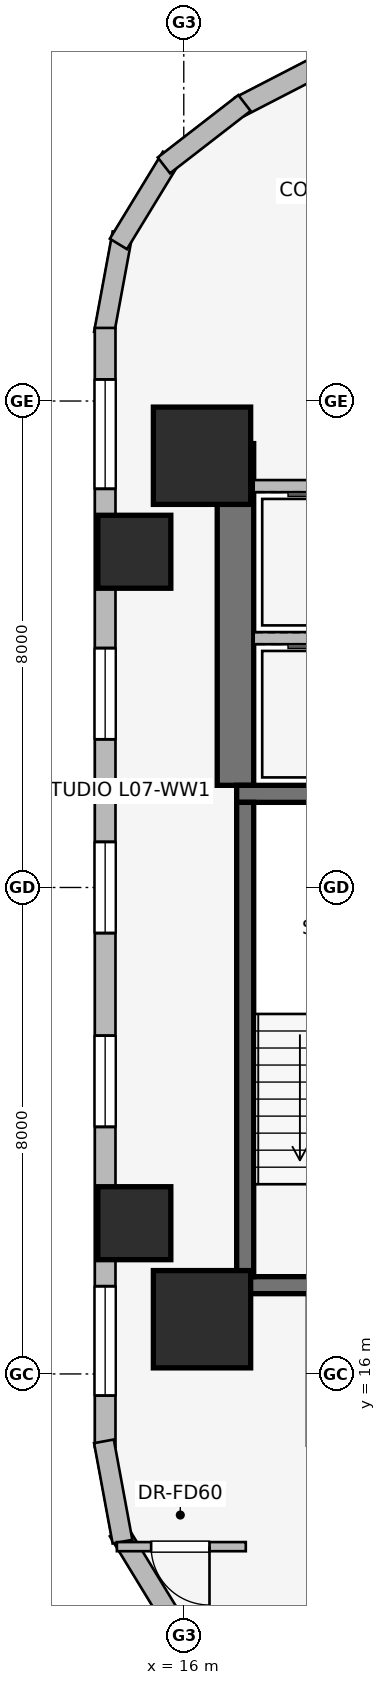
"""IFC4 building model, lengths in metres.
Left out: names, types, materials, properties, quantities, classifications, styles, units other than length and angle.
Written with IfcOpenShell. Run it as: python <this file> out.ifc"""

import sys

from ifc_helpers import new_model, si_unit, direction, frame, frame_2d, origin, origin_2d, place, context, subcontext, project, spatial, rectangle, extrude, element, fill, save


model = new_model("IFC4")
c1 = context("Model", 3, precision=1e-05, world=origin(), true_north=direction((0.0, 1.0)))
c2 = subcontext(c1, "Body", "Model", "MODEL_VIEW")
j1 = project(units=[si_unit("LENGTHUNIT", "METRE"), si_unit("PLANEANGLEUNIT", "RADIAN")], contexts=[c1])
p1 = place(None, origin())
s1 = spatial("IfcSite", under=j1, at=p1, CompositionType="ELEMENT")
p2 = place(p1, origin())
s2 = spatial("IfcBuilding", under=s1, at=p2, CompositionType="ELEMENT")
p3 = place(p2, frame((0.0, 0.0, 30.65)))
s3 = spatial("IfcBuildingStorey", under=s2, at=p3, CompositionType="ELEMENT", Elevation=30.65)
p4 = place(p3, frame((16.85, 25.68, 0.0), z_axis=(0.0, 0.0, 1.0), x_axis=(0.0, 1.0, 0.0)))
e1 = element("IfcWall", 1, at=p4, inside=s3, PredefinedType="SHEAR", context=c2, shape_type="SweptSolid", body=[
    extrude(rectangle(XDim=5.62, YDim=0.6, at=frame_2d((2.81, 0.0))), origin(), (0.0, 0.0, 1.0), 3.65),
])
for number, where, z_axis, x_axis in (
    (2, (16.87, 17.46, 0.0), (0.0, 0.0, 1.0), (1.0, 0.0, 0.0)),
    (3, (20.63, 25.54, 0.0), (0.0, 0.0, 1.0), (-1.0, 0.0, 0.0)),
):
    element("IfcWall", number, at=place(p3, frame(where, z_axis=z_axis, x_axis=x_axis)), inside=s3, PredefinedType="SHEAR", context=c2, shape_type="SweptSolid", body=[
        extrude(rectangle(XDim=3.76, YDim=0.28, at=frame_2d((1.88, 0.0))), origin(), (0.0, 0.0, 1.0), 3.65),
    ])
p5 = place(p3, frame((17.01, 25.4, 0.0), z_axis=(0.0, 0.0, 1.0), x_axis=(0.0, -1.0, 0.0)))
e4 = element("IfcWall", 4, at=p5, inside=s3, PredefinedType="SHEAR", context=c2, shape_type="SweptSolid", body=[
    extrude(rectangle(XDim=7.8, YDim=0.28, at=frame_2d((3.9, 0.0))), origin(), (0.0, 0.0, 1.0), 3.65),
])
for number, where, z_axis, x_axis in (
    (5, (16.3, 16.9, 0.0), (0.0, 0.0, 1.0), (1.0, 0.0, 0.0)),
    (6, (16.3, 31.1, 0.0), (0.0, 0.0, 1.0), (1.0, 0.0, 0.0)),
):
    element("IfcColumn", number, at=place(p3, frame(where, z_axis=z_axis, x_axis=x_axis)), inside=s3, PredefinedType="COLUMN", context=c2, shape_type="SweptSolid", body=[
        extrude(rectangle(XDim=1.6, YDim=1.6, at=origin_2d()), origin(), (0.0, 0.0, 1.0), 3.65),
    ])
for number, where, z_axis, x_axis in (
    (7, (15.187, 29.521, 0.0), (0.0, 0.0, 1.0), (1.0, 0.0, 0.0)),
    (8, (15.187, 18.479, 0.0), (0.0, 0.0, 1.0), (1.0, 0.0, 0.0)),
):
    element("IfcColumn", number, at=place(p3, frame(where, z_axis=z_axis, x_axis=x_axis)), inside=s3, PredefinedType="COLUMN", context=c2, shape_type="SweptSolid", body=[
        extrude(rectangle(XDim=1.2, YDim=1.2, at=origin_2d()), origin(), (0.0, 0.0, 1.0), 3.65),
    ])
p6 = place(p3, frame((16.924, 36.841, 0.0), z_axis=(0.0, 0.0, 1.0), x_axis=(0.888634413993, 0.458616264721, 0.0)))
e9 = element("IfcWall", 9, at=p6, inside=s3, PredefinedType="STANDARD", context=c2, shape_type="SweptSolid", body=[
    extrude(rectangle(XDim=20.531, YDim=0.34, at=frame_2d((10.266, 0.0))), origin(), (0.0, 0.0, 1.0), 2.684),
])
p7 = place(p6, frame((2.161, 0.0, 0.75)))
e10 = element("IfcOpeningElement", 10, at=p7, cuts=e9, PredefinedType="OPENING", context=c2, shape_type="SweptSolid", body=[
    extrude(rectangle(XDim=1.05, YDim=1.4, at=frame_2d((0.525, 0.7))), frame((0.0, 0.18, 0.0), z_axis=(0.0, -1.0, 0.0), x_axis=(1.0, 0.0, 0.0)), (0.0, 0.0, 1.0), 0.36),
])
p8 = place(p6, frame((5.903, 0.0, 0.75)))
e11 = element("IfcOpeningElement", 11, at=p8, cuts=e9, PredefinedType="OPENING", context=c2, shape_type="SweptSolid", body=[
    extrude(rectangle(XDim=1.5, YDim=1.5, at=frame_2d((0.75, 0.75))), frame((0.0, 0.18, 0.0), z_axis=(0.0, -1.0, 0.0), x_axis=(1.0, 0.0, 0.0)), (0.0, 0.0, 1.0), 0.36),
])
p9 = place(p6, frame((9.516, 0.0, 0.75)))
e12 = element("IfcOpeningElement", 12, at=p9, cuts=e9, PredefinedType="OPENING", context=c2, shape_type="SweptSolid", body=[
    extrude(rectangle(XDim=1.5, YDim=1.5, at=frame_2d((0.75, 0.75))), frame((0.0, 0.18, 0.0), z_axis=(0.0, -1.0, 0.0), x_axis=(1.0, 0.0, 0.0)), (0.0, 0.0, 1.0), 0.36),
])
p10 = place(p6, frame((13.129, 0.0, 0.75)))
e13 = element("IfcOpeningElement", 13, at=p10, cuts=e9, PredefinedType="OPENING", context=c2, shape_type="SweptSolid", body=[
    extrude(rectangle(XDim=1.5, YDim=1.5, at=frame_2d((0.75, 0.75))), frame((0.0, 0.18, 0.0), z_axis=(0.0, -1.0, 0.0), x_axis=(1.0, 0.0, 0.0)), (0.0, 0.0, 1.0), 0.36),
])
p11 = place(p6, frame((17.476, 0.0, 0.75)))
e14 = element("IfcOpeningElement", 14, at=p11, cuts=e9, PredefinedType="OPENING", context=c2, shape_type="SweptSolid", body=[
    extrude(rectangle(XDim=1.05, YDim=1.4, at=frame_2d((0.525, 0.7))), frame((0.0, 0.18, 0.0), z_axis=(0.0, -1.0, 0.0), x_axis=(1.0, 0.0, 0.0)), (0.0, 0.0, 1.0), 0.36),
])
p12 = place(p3, frame((14.687, 33.108, 0.0), z_axis=(0.0, 0.0, 1.0), x_axis=(0.181714143354, 0.983351397063, 0.0)))
e15 = element("IfcWall", 15, at=p12, inside=s3, PredefinedType="STANDARD", context=c2, shape_type="SweptSolid", body=[
    extrude(rectangle(XDim=1.678, YDim=0.33, at=frame_2d((0.839, 0.0))), origin(), (0.0, 0.0, 1.0), 3.39),
])
p13 = place(p3, frame((14.925, 34.583, 0.0), z_axis=(0.0, 0.0, 1.0), x_axis=(0.520584129191, 0.853810379671, 0.0)))
e16 = element("IfcWall", 16, at=p13, inside=s3, PredefinedType="STANDARD", context=c2, shape_type="SweptSolid", body=[
    extrude(rectangle(XDim=1.677, YDim=0.33, at=frame_2d((0.838, 0.0))), origin(), (0.0, 0.0, 1.0), 3.39),
])
p14 = place(p3, frame((15.673, 35.875, 0.0), z_axis=(0.0, 0.0, 1.0), x_axis=(0.790691856293, 0.61221433207, 0.0)))
e17 = element("IfcWall", 17, at=p14, inside=s3, PredefinedType="STANDARD", context=c2, shape_type="SweptSolid", body=[
    extrude(rectangle(XDim=1.676, YDim=0.33, at=frame_2d((0.838, 0.0))), origin(), (0.0, 0.0, 1.0), 3.39),
])
p15 = place(p3, frame((14.707, 14.798, 0.0), z_axis=(0.0, 0.0, 1.0), x_axis=(0.0, 1.0, 0.0)))
e18 = element("IfcWall", 18, at=p15, inside=s3, PredefinedType="STANDARD", context=c2, shape_type="SweptSolid", body=[
    extrude(rectangle(XDim=18.404, YDim=0.34, at=frame_2d((9.202, 0.0))), origin(), (0.0, 0.0, 1.0), 2.684),
])
p16 = place(p15, frame((0.845, 0.0, 0.75)))
e19 = element("IfcOpeningElement", 19, at=p16, cuts=e18, PredefinedType="OPENING", context=c2, shape_type="SweptSolid", body=[
    extrude(rectangle(XDim=1.8, YDim=1.5, at=frame_2d((0.9, 0.75))), frame((0.0, 0.18, 0.0), z_axis=(0.0, -1.0, 0.0), x_axis=(1.0, 0.0, 0.0)), (0.0, 0.0, 1.0), 0.36),
])
p17 = place(p15, frame((5.265, 0.0, 0.75)))
e20 = element("IfcOpeningElement", 20, at=p17, cuts=e18, PredefinedType="OPENING", context=c2, shape_type="SweptSolid", body=[
    extrude(rectangle(XDim=1.5, YDim=1.5, at=frame_2d((0.75, 0.75))), frame((0.0, 0.18, 0.0), z_axis=(0.0, -1.0, 0.0), x_axis=(1.0, 0.0, 0.0)), (0.0, 0.0, 1.0), 0.36),
])
p18 = place(p15, frame((8.452, 0.0, 0.75)))
e21 = element("IfcOpeningElement", 21, at=p18, cuts=e18, PredefinedType="OPENING", context=c2, shape_type="SweptSolid", body=[
    extrude(rectangle(XDim=1.5, YDim=1.5, at=frame_2d((0.75, 0.75))), frame((0.0, 0.18, 0.0), z_axis=(0.0, -1.0, 0.0), x_axis=(1.0, 0.0, 0.0)), (0.0, 0.0, 1.0), 0.36),
])
p19 = place(p15, frame((11.639, 0.0, 0.75)))
e22 = element("IfcOpeningElement", 22, at=p19, cuts=e18, PredefinedType="OPENING", context=c2, shape_type="SweptSolid", body=[
    extrude(rectangle(XDim=1.5, YDim=1.5, at=frame_2d((0.75, 0.75))), frame((0.0, 0.18, 0.0), z_axis=(0.0, -1.0, 0.0), x_axis=(1.0, 0.0, 0.0)), (0.0, 0.0, 1.0), 0.36),
])
p20 = place(p15, frame((15.758, 0.0, 0.75)))
e23 = element("IfcOpeningElement", 23, at=p20, cuts=e18, PredefinedType="OPENING", context=c2, shape_type="SweptSolid", body=[
    extrude(rectangle(XDim=1.8, YDim=1.5, at=frame_2d((0.9, 0.75))), frame((0.0, 0.18, 0.0), z_axis=(0.0, -1.0, 0.0), x_axis=(1.0, 0.0, 0.0)), (0.0, 0.0, 1.0), 0.36),
])
p21 = place(p3, frame((16.998, 11.099, 0.0), z_axis=(0.0, 0.0, 1.0), x_axis=(-0.790691856293, 0.61221433207, 0.0)))
e24 = element("IfcWall", 24, at=p21, inside=s3, PredefinedType="STANDARD", context=c2, shape_type="SweptSolid", body=[
    extrude(rectangle(XDim=1.676, YDim=0.33, at=frame_2d((0.838, 0.0))), origin(), (0.0, 0.0, 1.0), 3.39),
])
p22 = place(p3, frame((15.798, 11.985, 0.0), z_axis=(0.0, 0.0, 1.0), x_axis=(-0.520584129191, 0.853810379671, 0.0)))
e25 = element("IfcWall", 25, at=p22, inside=s3, PredefinedType="STANDARD", context=c2, shape_type="SweptSolid", body=[
    extrude(rectangle(XDim=1.677, YDim=0.33, at=frame_2d((0.838, 0.0))), origin(), (0.0, 0.0, 1.0), 3.39),
])
p23 = place(p3, frame((14.992, 13.242, 0.0), z_axis=(0.0, 0.0, 1.0), x_axis=(-0.181714143354, 0.983351397063, 0.0)))
e26 = element("IfcWall", 26, at=p23, inside=s3, PredefinedType="STANDARD", context=c2, shape_type="SweptSolid", body=[
    extrude(rectangle(XDim=1.678, YDim=0.33, at=frame_2d((0.839, 0.0))), origin(), (0.0, 0.0, 1.0), 3.39),
])
p24 = place(p3, frame((17.15, 28.1, 0.0), z_axis=(0.0, 0.0, 1.0), x_axis=(1.0, 0.0, 0.0)))
e27 = element("IfcWall", 27, at=p24, inside=s3, PredefinedType="PARTITIONING", context=c2, shape_type="SweptSolid", body=[
    extrude(rectangle(XDim=2.5, YDim=0.2, at=frame_2d((1.25, 0.0))), origin(), (0.0, 0.0, 1.0), 3.39),
])
p25 = place(p3, frame((19.65, 30.6, 0.0), z_axis=(0.0, 0.0, 1.0), x_axis=(-1.0, 0.0, 0.0)))
e28 = element("IfcWall", 28, at=p25, inside=s3, PredefinedType="PARTITIONING", context=c2, shape_type="SweptSolid", body=[
    extrude(rectangle(XDim=2.5, YDim=0.2, at=frame_2d((1.25, 0.0))), origin(), (0.0, 0.0, 1.0), 2.29),
])
p26 = place(p3, frame((17.02, 13.16, 0.0), z_axis=(0.0, 0.0, 1.0), x_axis=(-1.0, 0.0, 0.0)))
e29 = element("IfcWall", 29, at=p26, inside=s3, PredefinedType="PARTITIONING", context=c2, shape_type="SweptSolid", body=[
    extrude(rectangle(XDim=2.12, YDim=0.15, at=frame_2d((1.06, 0.0))), origin(), (0.0, 0.0, 1.0), 3.39),
])
p27 = place(p26, frame((0.597, 0.0, 0.0)))
e30 = element("IfcOpeningElement", 30, at=p27, cuts=e29, PredefinedType="OPENING", context=c2, shape_type="SweptSolid", body=[
    extrude(rectangle(XDim=0.96, YDim=2.0, at=frame_2d((0.48, 1.0))), frame((0.0, 0.085, 0.0), z_axis=(0.0, -1.0, 0.0), x_axis=(1.0, 0.0, 0.0)), (0.0, 0.0, 1.0), 0.17),
])
p28 = place(p16, origin())
e31 = element("IfcWindow", 31, at=p28, inside=s3, PartitioningType="SINGLE_PANEL", PredefinedType="WINDOW", context=c2, shape_type="SweptSolid", body=[
    extrude(rectangle(XDim=1.8, YDim=1.5, at=frame_2d((0.9, 0.75))), frame((0.0, 0.03, 0.0), z_axis=(0.0, -1.0, 0.0), x_axis=(1.0, 0.0, 0.0)), (0.0, 0.0, 1.0), 0.06),
])
fill(e19, e31)
p29 = place(p17, origin())
e32 = element("IfcWindow", 32, at=p29, inside=s3, PartitioningType="SINGLE_PANEL", PredefinedType="WINDOW", context=c2, shape_type="SweptSolid", body=[
    extrude(rectangle(XDim=1.5, YDim=1.5, at=frame_2d((0.75, 0.75))), frame((0.0, 0.03, 0.0), z_axis=(0.0, -1.0, 0.0), x_axis=(1.0, 0.0, 0.0)), (0.0, 0.0, 1.0), 0.06),
])
fill(e20, e32)
p30 = place(p18, origin())
e33 = element("IfcWindow", 33, at=p30, inside=s3, PartitioningType="SINGLE_PANEL", PredefinedType="WINDOW", context=c2, shape_type="SweptSolid", body=[
    extrude(rectangle(XDim=1.5, YDim=1.5, at=frame_2d((0.75, 0.75))), frame((0.0, 0.03, 0.0), z_axis=(0.0, -1.0, 0.0), x_axis=(1.0, 0.0, 0.0)), (0.0, 0.0, 1.0), 0.06),
])
fill(e21, e33)
p31 = place(p19, origin())
e34 = element("IfcWindow", 34, at=p31, inside=s3, PartitioningType="SINGLE_PANEL", PredefinedType="WINDOW", context=c2, shape_type="SweptSolid", body=[
    extrude(rectangle(XDim=1.5, YDim=1.5, at=frame_2d((0.75, 0.75))), frame((0.0, 0.03, 0.0), z_axis=(0.0, -1.0, 0.0), x_axis=(1.0, 0.0, 0.0)), (0.0, 0.0, 1.0), 0.06),
])
fill(e22, e34)
p32 = place(p20, origin())
e35 = element("IfcWindow", 35, at=p32, inside=s3, PartitioningType="SINGLE_PANEL", PredefinedType="WINDOW", context=c2, shape_type="SweptSolid", body=[
    extrude(rectangle(XDim=1.8, YDim=1.5, at=frame_2d((0.9, 0.75))), frame((0.0, 0.03, 0.0), z_axis=(0.0, -1.0, 0.0), x_axis=(1.0, 0.0, 0.0)), (0.0, 0.0, 1.0), 0.06),
])
fill(e23, e35)
p33 = place(p27, origin())
e36 = element("IfcDoor", 36, at=p33, inside=s3, OperationType="SINGLE_SWING_LEFT", PredefinedType="DOOR", context=c2, shape_type="SweptSolid", body=[
    extrude(rectangle(XDim=0.96, YDim=2.0, at=frame_2d((0.48, 1.0))), frame((0.0, 0.025, 0.0), z_axis=(0.0, -1.0, 0.0), x_axis=(1.0, 0.0, 0.0)), (0.0, 0.0, 1.0), 0.05),
])
fill(e30, e36)
save(model, sys.argv[1])
